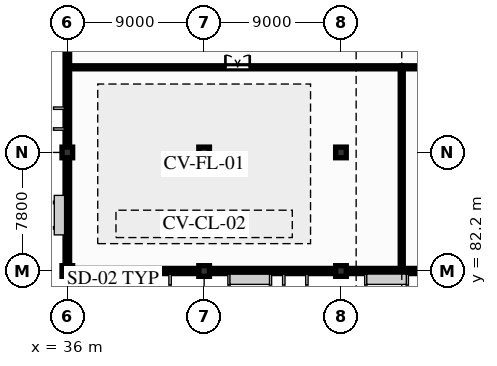
"""IFC4 building model, lengths in metres.
Left out: names, types, materials, properties, quantities, classifications, styles, units other than length and angle.
Written with IfcOpenShell. Run it as: python <this file> out.ifc"""

import sys

from ifc_helpers import new_model, si_unit, direction, frame, frame_2d, origin, origin_2d, place, context, subcontext, project, spatial, rectangle, extrude, element, fill, save


model = new_model("IFC4")
c1 = context("Model", 3, precision=1e-05, world=origin(), true_north=direction((0.0, 1.0)))
c2 = subcontext(c1, "Body", "Model", "MODEL_VIEW")
j1 = project(units=[si_unit("LENGTHUNIT", "METRE"), si_unit("PLANEANGLEUNIT", "RADIAN")], contexts=[c1])
p1 = place(None, origin())
s1 = spatial("IfcSite", under=j1, at=p1, CompositionType="ELEMENT")
p2 = place(p1, origin())
s2 = spatial("IfcBuilding", under=s1, at=p2, CompositionType="ELEMENT")
p3 = place(p2, frame((0.0, 0.0, 12.78)))
s3 = spatial("IfcBuildingStorey", under=s2, at=p3, CompositionType="ELEMENT", Elevation=12.78)
for number, where, z_axis, x_axis in (
    (1, (36.0, 82.2, 0.0), (0.0, 0.0, 1.0), (1.0, 0.0, 0.0)),
    (2, (36.0, 90.0, 0.0), (0.0, 0.0, 1.0), (1.0, 0.0, 0.0)),
    (3, (45.0, 82.2, 0.0), (0.0, 0.0, 1.0), (1.0, 0.0, 0.0)),
    (4, (45.0, 90.0, 0.0), (0.0, 0.0, 1.0), (1.0, 0.0, 0.0)),
    (5, (54.0, 82.2, 0.0), (0.0, 0.0, 1.0), (1.0, 0.0, 0.0)),
    (6, (54.0, 90.0, 0.0), (0.0, 0.0, 1.0), (1.0, 0.0, 0.0)),
):
    element("IfcColumn", number, at=place(p3, frame(where, z_axis=z_axis, x_axis=x_axis)), inside=s3, PredefinedType="COLUMN", context=c2, shape_type="SweptSolid", body=[
        extrude(rectangle(XDim=0.7, YDim=0.7, at=origin_2d()), origin(), (0.0, 0.0, 1.0), 3.74),
    ])
p4 = place(p3, frame((36.0, 82.2, 0.0), z_axis=(0.0, 0.0, 1.0), x_axis=(1.0, 0.0, 0.0)))
e7 = element("IfcWall", 7, at=p4, inside=s3, PredefinedType="SOLIDWALL", context=c2, shape_type="SweptSolid", body=[
    extrude(rectangle(XDim=9.0, YDim=0.34, at=frame_2d((4.5, 0.0))), origin(), (0.0, 0.0, 1.0), 3.42),
])
p5 = place(p4, frame((1.8, 0.0, 0.85)))
e8 = element("IfcOpeningElement", 8, at=p5, cuts=e7, PredefinedType="OPENING", context=c2, shape_type="SweptSolid", body=[
    extrude(rectangle(XDim=2.4, YDim=1.1, at=frame_2d((1.2, 0.55))), frame((0.0, 0.18, 0.0), z_axis=(0.0, -1.0, 0.0), x_axis=(1.0, 0.0, 0.0)), (0.0, 0.0, 1.0), 0.36),
])
p6 = place(p4, frame((5.4, 0.0, 0.575)))
e9 = element("IfcOpeningElement", 9, at=p6, cuts=e7, PredefinedType="OPENING", context=c2, shape_type="SweptSolid", body=[
    extrude(rectangle(XDim=1.2, YDim=2.1, at=frame_2d((0.6, 1.05))), frame((0.0, 0.18, 0.0), z_axis=(0.0, -1.0, 0.0), x_axis=(1.0, 0.0, 0.0)), (0.0, 0.0, 1.0), 0.36),
])
p7 = place(p3, frame((45.0, 82.2, 0.0), z_axis=(0.0, 0.0, 1.0), x_axis=(1.0, 0.0, 0.0)))
e10 = element("IfcWall", 10, at=p7, inside=s3, PredefinedType="SOLIDWALL", context=c2, shape_type="SweptSolid", body=[
    extrude(rectangle(XDim=9.0, YDim=0.34, at=frame_2d((4.5, 0.0))), origin(), (0.0, 0.0, 1.0), 3.42),
])
p8 = place(p7, frame((1.8, 0.0, 0.85)))
e11 = element("IfcOpeningElement", 11, at=p8, cuts=e10, PredefinedType="OPENING", context=c2, shape_type="SweptSolid", body=[
    extrude(rectangle(XDim=2.4, YDim=1.1, at=frame_2d((1.2, 0.55))), frame((0.0, 0.18, 0.0), z_axis=(0.0, -1.0, 0.0), x_axis=(1.0, 0.0, 0.0)), (0.0, 0.0, 1.0), 0.36),
])
p9 = place(p7, frame((5.4, 0.0, 0.575)))
e12 = element("IfcOpeningElement", 12, at=p9, cuts=e10, PredefinedType="OPENING", context=c2, shape_type="SweptSolid", body=[
    extrude(rectangle(XDim=1.2, YDim=2.1, at=frame_2d((0.6, 1.05))), frame((0.0, 0.18, 0.0), z_axis=(0.0, -1.0, 0.0), x_axis=(1.0, 0.0, 0.0)), (0.0, 0.0, 1.0), 0.36),
])
p10 = place(p3, frame((54.0, 82.2, 0.0), z_axis=(0.0, 0.0, 1.0), x_axis=(1.0, 0.0, 0.0)))
e13 = element("IfcWall", 13, at=p10, inside=s3, PredefinedType="SOLIDWALL", context=c2, shape_type="SweptSolid", body=[
    extrude(rectangle(XDim=9.0, YDim=0.34, at=frame_2d((4.5, 0.0))), origin(), (0.0, 0.0, 1.0), 3.42),
])
p11 = place(p10, frame((5.4, 0.0, 0.575)))
e14 = element("IfcOpeningElement", 14, at=p11, cuts=e13, PredefinedType="OPENING", context=c2, shape_type="SweptSolid", body=[
    extrude(rectangle(XDim=1.2, YDim=2.1, at=frame_2d((0.6, 1.05))), frame((0.0, 0.18, 0.0), z_axis=(0.0, -1.0, 0.0), x_axis=(1.0, 0.0, 0.0)), (0.0, 0.0, 1.0), 0.36),
])
p12 = place(p3, frame((36.0, 82.2, 0.0), z_axis=(0.0, 0.0, 1.0), x_axis=(0.0, 1.0, 0.0)))
e15 = element("IfcWall", 15, at=p12, inside=s3, PredefinedType="SOLIDWALL", context=c2, shape_type="SweptSolid", body=[
    extrude(rectangle(XDim=31.8, YDim=0.3, at=frame_2d((15.9, 0.0))), origin(), (0.0, 0.0, 1.0), 2.705),
])
p13 = place(p12, frame((3.0, 0.0, 0.735)))
e16 = element("IfcOpeningElement", 16, at=p13, cuts=e15, PredefinedType="OPENING", context=c2, shape_type="SweptSolid", body=[
    extrude(rectangle(XDim=1.35, YDim=1.85, at=frame_2d((0.675, 0.925))), frame((0.0, 0.16, 0.0), z_axis=(0.0, -1.0, 0.0), x_axis=(1.0, 0.0, 0.0)), (0.0, 0.0, 1.0), 0.32),
])
p14 = place(p12, frame((9.5, 0.0, 0.835)))
e17 = element("IfcOpeningElement", 17, at=p14, cuts=e15, PredefinedType="OPENING", context=c2, shape_type="SweptSolid", body=[
    extrude(rectangle(XDim=1.05, YDim=1.75, at=frame_2d((0.525, 0.875))), frame((0.0, 0.16, 0.0), z_axis=(0.0, -1.0, 0.0), x_axis=(1.0, 0.0, 0.0)), (0.0, 0.0, 1.0), 0.32),
])
p15 = place(p12, frame((16.5, 0.0, 0.485)))
e18 = element("IfcOpeningElement", 18, at=p15, cuts=e15, PredefinedType="OPENING", context=c2, shape_type="SweptSolid", body=[
    extrude(rectangle(XDim=1.5, YDim=2.1, at=frame_2d((0.75, 1.05))), frame((0.0, 0.16, 0.0), z_axis=(0.0, -1.0, 0.0), x_axis=(1.0, 0.0, 0.0)), (0.0, 0.0, 1.0), 0.32),
])
p16 = place(p3, frame((36.0, 95.6, 0.0), z_axis=(0.0, 0.0, 1.0), x_axis=(1.0, 0.0, 0.0)))
e19 = element("IfcWall", 19, at=p16, inside=s3, PredefinedType="PARTITIONING", context=c2, shape_type="SweptSolid", body=[
    extrude(rectangle(XDim=22.0, YDim=0.2, at=frame_2d((11.0, 0.0))), origin(), (0.0, 0.0, 1.0), 3.42),
])
p17 = place(p16, frame((10.4, 0.0, 0.0)))
e20 = element("IfcOpeningElement", 20, at=p17, cuts=e19, PredefinedType="OPENING", context=c2, shape_type="SweptSolid", body=[
    extrude(rectangle(XDim=1.6, YDim=2.2, at=frame_2d((0.8, 1.1))), frame((0.0, 0.11, 0.0), z_axis=(0.0, -1.0, 0.0), x_axis=(1.0, 0.0, 0.0)), (0.0, 0.0, 1.0), 0.22),
])
p18 = place(p3, frame((58.0, 95.6, 0.0), z_axis=(0.0, 0.0, 1.0), x_axis=(1.0, 0.0, 0.0)))
e21 = element("IfcWall", 21, at=p18, inside=s3, PredefinedType="PARTITIONING", context=c2, shape_type="SweptSolid", body=[
    extrude(rectangle(XDim=20.0, YDim=0.2, at=frame_2d((10.0, 0.0))), origin(), (0.0, 0.0, 1.0), 3.42),
])
p19 = place(p18, frame((9.4, 0.0, 0.0)))
e22 = element("IfcOpeningElement", 22, at=p19, cuts=e21, PredefinedType="OPENING", context=c2, shape_type="SweptSolid", body=[
    extrude(rectangle(XDim=1.6, YDim=2.2, at=frame_2d((0.8, 1.1))), frame((0.0, 0.11, 0.0), z_axis=(0.0, -1.0, 0.0), x_axis=(1.0, 0.0, 0.0)), (0.0, 0.0, 1.0), 0.22),
])
p20 = place(p3, frame((58.0, 82.2, 0.0), z_axis=(0.0, 0.0, 1.0), x_axis=(0.0, 1.0, 0.0)))
e23 = element("IfcWall", 23, at=p20, inside=s3, PredefinedType="PARTITIONING", context=c2, shape_type="SweptSolid", body=[
    extrude(rectangle(XDim=13.4, YDim=0.2, at=frame_2d((6.7, 0.0))), origin(), (0.0, 0.0, 1.0), 3.42),
])
p21 = place(p5, origin())
e24 = element("IfcWindow", 24, at=p21, inside=s3, PartitioningType="SINGLE_PANEL", PredefinedType="WINDOW", context=c2, shape_type="SweptSolid", body=[
    extrude(rectangle(XDim=2.4, YDim=1.1, at=frame_2d((1.2, 0.55))), frame((0.0, 0.03, 0.0), z_axis=(0.0, -1.0, 0.0), x_axis=(1.0, 0.0, 0.0)), (0.0, 0.0, 1.0), 0.06),
])
fill(e8, e24)
p22 = place(p6, origin())
e25 = element("IfcWindow", 25, at=p22, inside=s3, PartitioningType="SINGLE_PANEL", PredefinedType="WINDOW", context=c2, shape_type="SweptSolid", body=[
    extrude(rectangle(XDim=1.2, YDim=2.1, at=frame_2d((0.6, 1.05))), frame((0.0, 0.03, 0.0), z_axis=(0.0, -1.0, 0.0), x_axis=(1.0, 0.0, 0.0)), (0.0, 0.0, 1.0), 0.06),
])
fill(e9, e25)
p23 = place(p8, origin())
e26 = element("IfcWindow", 26, at=p23, inside=s3, PartitioningType="SINGLE_PANEL", PredefinedType="WINDOW", context=c2, shape_type="SweptSolid", body=[
    extrude(rectangle(XDim=2.4, YDim=1.1, at=frame_2d((1.2, 0.55))), frame((0.0, 0.03, 0.0), z_axis=(0.0, -1.0, 0.0), x_axis=(1.0, 0.0, 0.0)), (0.0, 0.0, 1.0), 0.06),
])
fill(e11, e26)
p24 = place(p9, origin())
e27 = element("IfcWindow", 27, at=p24, inside=s3, PartitioningType="SINGLE_PANEL", PredefinedType="WINDOW", context=c2, shape_type="SweptSolid", body=[
    extrude(rectangle(XDim=1.2, YDim=2.1, at=frame_2d((0.6, 1.05))), frame((0.0, 0.03, 0.0), z_axis=(0.0, -1.0, 0.0), x_axis=(1.0, 0.0, 0.0)), (0.0, 0.0, 1.0), 0.06),
])
fill(e12, e27)
p25 = place(p13, origin())
e28 = element("IfcWindow", 28, at=p25, inside=s3, PartitioningType="SINGLE_PANEL", PredefinedType="WINDOW", context=c2, shape_type="SweptSolid", body=[
    extrude(rectangle(XDim=1.35, YDim=1.85, at=frame_2d((0.675, 0.925))), frame((0.0, 0.03, 0.0), z_axis=(0.0, -1.0, 0.0), x_axis=(1.0, 0.0, 0.0)), (0.0, 0.0, 1.0), 0.06),
])
fill(e16, e28)
p26 = place(p14, origin())
e29 = element("IfcWindow", 29, at=p26, inside=s3, PartitioningType="SINGLE_PANEL", PredefinedType="WINDOW", context=c2, shape_type="SweptSolid", body=[
    extrude(rectangle(XDim=1.05, YDim=1.75, at=frame_2d((0.525, 0.875))), frame((0.0, 0.03, 0.0), z_axis=(0.0, -1.0, 0.0), x_axis=(1.0, 0.0, 0.0)), (0.0, 0.0, 1.0), 0.06),
])
fill(e17, e29)
p27 = place(p17, origin())
e30 = element("IfcDoor", 30, at=p27, inside=s3, OperationType="DOUBLE_DOOR_SINGLE_SWING", PredefinedType="DOOR", context=c2, shape_type="SweptSolid", body=[
    extrude(rectangle(XDim=1.6, YDim=2.2, at=frame_2d((0.8, 1.1))), frame((0.0, 0.025, 0.0), z_axis=(0.0, -1.0, 0.0), x_axis=(1.0, 0.0, 0.0)), (0.0, 0.0, 1.0), 0.05),
])
fill(e20, e30)
save(model, sys.argv[1])
